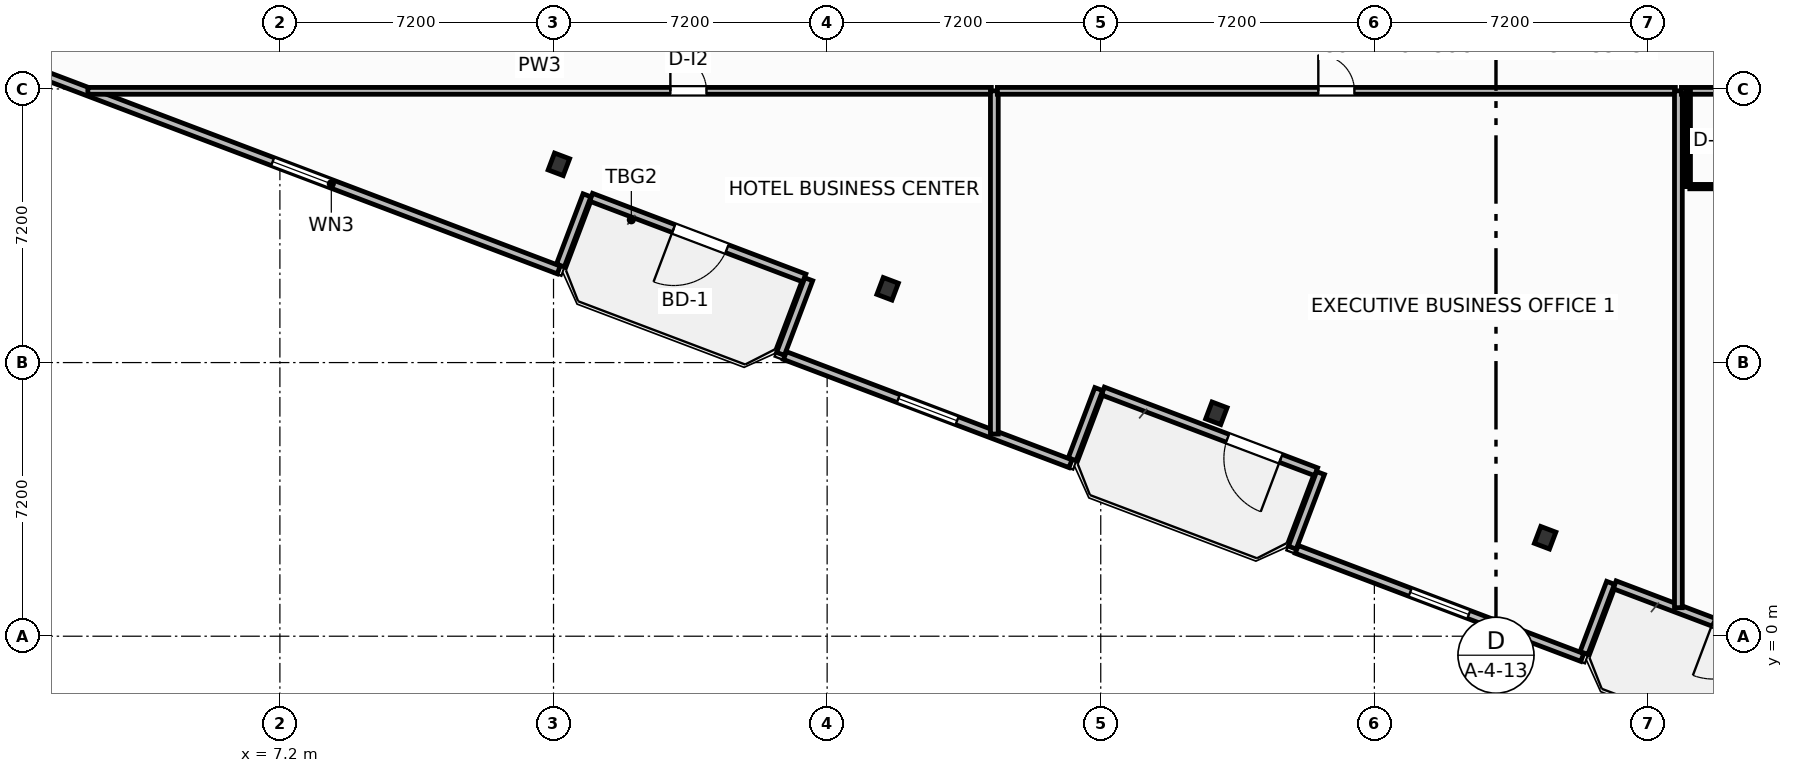
"""IFC4 building model, lengths in metres.
Left out: names, types, materials, properties, quantities, classifications, styles, units other than length and angle.
Written with IfcOpenShell. Run it as: python <this file> out.ifc"""

import sys

from ifc_helpers import new_model, si_unit, direction, frame, frame_2d, origin, origin_2d, place, context, subcontext, project, spatial, rectangle, i_section, extrude, element, fill, save


model = new_model("IFC4")
c1 = context("Model", 3, precision=1e-05, world=origin(), true_north=direction((0.0, 1.0)))
c2 = subcontext(c1, "Body", "Model", "MODEL_VIEW")
j1 = project(units=[si_unit("LENGTHUNIT", "METRE"), si_unit("PLANEANGLEUNIT", "RADIAN")], contexts=[c1])
p1 = place(None, origin())
s1 = spatial("IfcSite", under=j1, at=p1, CompositionType="ELEMENT")
p2 = place(p1, origin())
s2 = spatial("IfcBuilding", under=s1, at=p2, CompositionType="ELEMENT")
p3 = place(p2, frame((0.0, 0.0, 87.3)))
s3 = spatial("IfcBuildingStorey", under=s2, at=p3, CompositionType="ELEMENT", Elevation=87.3)
for number, where, z_axis, x_axis in (
    (1, (14.541, 12.416, 0.0), (0.0, 0.0, 1.0), (0.935, -0.354, 0.0)),
    (2, (23.192, 9.141, 0.0), (0.0, 0.0, 1.0), (0.935, -0.354, 0.0)),
    (3, (31.843, 5.866, 0.0), (0.0, 0.0, 1.0), (0.935, -0.354, 0.0)),
    (4, (40.493, 2.591, 0.0), (0.0, 0.0, 1.0), (0.935, -0.354, 0.0)),
):
    element("IfcColumn", number, at=place(p3, frame(where, z_axis=z_axis, x_axis=x_axis)), inside=s3, PredefinedType="COLUMN", context=c2, shape_type="SweptSolid", body=[
        extrude(i_section(OverallWidth=0.424, OverallDepth=0.474, WebThickness=0.048, FlangeThickness=0.077, FilletRadius=0.025, at=origin_2d()), origin(), (0.0, 0.0, 1.0), 3.7),
    ])
p4 = place(p3, frame((21.0, 9.425, 0.0), z_axis=(0.0, 0.0, 1.0), x_axis=(-0.93521416643, 0.354082565101, 0.0)))
e5 = element("IfcWall", 5, at=p4, inside=s3, PredefinedType="SOLIDWALL", context=c2, shape_type="SweptSolid", body=[
    extrude(rectangle(XDim=6.0, YDim=0.22, at=frame_2d((3.0, 0.0))), origin(), (0.0, 0.0, 1.0), 2.73),
])
p5 = place(p4, frame((2.176, 0.0, 0.0)))
e6 = element("IfcOpeningElement", 6, at=p5, cuts=e5, PredefinedType="OPENING", context=c2, shape_type="SweptSolid", body=[
    extrude(rectangle(XDim=1.5, YDim=2.25, at=frame_2d((0.75, 1.125))), frame((0.0, 0.12, 0.0), z_axis=(0.0, -1.0, 0.0), x_axis=(1.0, 0.0, 0.0)), (0.0, 0.0, 1.0), 0.24),
])
p6 = place(p3, frame((34.468, 4.327, 0.0), z_axis=(0.0, 0.0, 1.0), x_axis=(-0.9352192676, 0.354069091436, 0.0)))
e7 = element("IfcWall", 7, at=p6, inside=s3, PredefinedType="SOLIDWALL", context=c2, shape_type="SweptSolid", body=[
    extrude(rectangle(XDim=6.0, YDim=0.22, at=frame_2d((3.0, 0.0))), origin(), (0.0, 0.0, 1.0), 2.73),
])
p7 = place(p6, frame((0.992, 0.0, 0.0)))
e8 = element("IfcOpeningElement", 8, at=p7, cuts=e7, PredefinedType="OPENING", context=c2, shape_type="SweptSolid", body=[
    extrude(rectangle(XDim=1.5, YDim=2.25, at=frame_2d((0.75, 1.125))), frame((0.0, 0.12, 0.0), z_axis=(0.0, -1.0, 0.0), x_axis=(1.0, 0.0, 0.0)), (0.0, 0.0, 1.0), 0.24),
])
p8 = place(p3, frame((47.935, -0.771, 0.0), z_axis=(0.0, 0.0, 1.0), x_axis=(-0.935227640088, 0.354046976001, 0.0)))
e9 = element("IfcWall", 9, at=p8, inside=s3, PredefinedType="SOLIDWALL", context=c2, shape_type="SweptSolid", body=[
    extrude(rectangle(XDim=6.0, YDim=0.22, at=frame_2d((3.0, 0.0))), origin(), (0.0, 0.0, 1.0), 2.73),
])
p9 = place(p8, frame((1.732, 0.0, 0.0)))
e10 = element("IfcOpeningElement", 10, at=p9, cuts=e9, PredefinedType="OPENING", context=c2, shape_type="SweptSolid", body=[
    extrude(rectangle(XDim=1.5, YDim=2.25, at=frame_2d((0.75, 1.125))), frame((0.0, 0.12, 0.0), z_axis=(0.0, -1.0, 0.0), x_axis=(1.0, 0.0, 0.0)), (0.0, 0.0, 1.0), 0.24),
])
p10 = place(p3, frame((1.026, 14.753, 0.0), z_axis=(0.0, 0.0, 1.0), x_axis=(0.935222448475, -0.354060689526, 0.0)))
e11 = element("IfcWall", 11, at=p10, inside=s3, PredefinedType="SOLIDWALL", context=c2, shape_type="SweptSolid", body=[
    extrude(rectangle(XDim=14.447, YDim=0.22, at=frame_2d((7.224, 0.0))), origin(), (0.0, 0.0, 1.0), 2.73),
])
p11 = place(p10, frame((6.399, 0.0, 0.8)))
e12 = element("IfcOpeningElement", 12, at=p11, cuts=e11, PredefinedType="OPENING", context=c2, shape_type="SweptSolid", body=[
    extrude(rectangle(XDim=1.65, YDim=1.65, at=frame_2d((0.825, 0.825))), frame((0.0, 0.12, 0.0), z_axis=(0.0, -1.0, 0.0), x_axis=(1.0, 0.0, 0.0)), (0.0, 0.0, 1.0), 0.24),
])
p12 = place(p3, frame((14.581, 9.755, 0.0), z_axis=(0.0, 0.0, 1.0), x_axis=(0.354061611705, 0.935222099352, 0.0)))
e13 = element("IfcWall", 13, at=p12, inside=s3, PredefinedType="SOLIDWALL", context=c2, shape_type="SweptSolid", body=[
    extrude(rectangle(XDim=1.975, YDim=0.22, at=frame_2d((0.987, 0.0))), origin(), (0.0, 0.0, 1.0), 2.73),
])
p13 = place(p3, frame((21.116, 9.392, 0.0), z_axis=(0.0, 0.0, 1.0), x_axis=(-0.353988291547, -0.935249854022, 0.0)))
e14 = element("IfcWall", 14, at=p13, inside=s3, PredefinedType="SOLIDWALL", context=c2, shape_type="SweptSolid", body=[
    extrude(rectangle(XDim=2.1, YDim=0.22, at=frame_2d((1.05, 0.0))), origin(), (0.0, 0.0, 1.0), 2.73),
])
p14 = place(p3, frame((20.49, 7.384, 0.0), z_axis=(0.0, 0.0, 1.0), x_axis=(0.935230796934, -0.354038636968, 0.0)))
e15 = element("IfcWall", 15, at=p14, inside=s3, PredefinedType="SOLIDWALL", context=c2, shape_type="SweptSolid", body=[
    extrude(rectangle(XDim=8.035, YDim=0.22, at=frame_2d((4.018, 0.0))), origin(), (0.0, 0.0, 1.0), 2.73),
])
p15 = place(p14, frame((3.192, 0.0, 0.8)))
e16 = element("IfcOpeningElement", 16, at=p15, cuts=e15, PredefinedType="OPENING", context=c2, shape_type="SweptSolid", body=[
    extrude(rectangle(XDim=1.65, YDim=1.65, at=frame_2d((0.825, 0.825))), frame((0.0, 0.12, 0.0), z_axis=(0.0, -1.0, 0.0), x_axis=(1.0, 0.0, 0.0)), (0.0, 0.0, 1.0), 0.24),
])
p16 = place(p3, frame((28.048, 4.656, 0.0), z_axis=(0.0, 0.0, 1.0), x_axis=(0.354128791944, 0.935196663123, 0.0)))
e17 = element("IfcWall", 17, at=p16, inside=s3, PredefinedType="SOLIDWALL", context=c2, shape_type="SweptSolid", body=[
    extrude(rectangle(XDim=1.975, YDim=0.22, at=frame_2d((0.988, 0.0))), origin(), (0.0, 0.0, 1.0), 2.73),
])
p17 = place(p3, frame((34.583, 4.294, 0.0), z_axis=(0.0, 0.0, 1.0), x_axis=(-0.354128469405, -0.935196785258, 0.0)))
e18 = element("IfcWall", 18, at=p17, inside=s3, PredefinedType="SOLIDWALL", context=c2, shape_type="SweptSolid", body=[
    extrude(rectangle(XDim=2.1, YDim=0.22, at=frame_2d((1.05, 0.0))), origin(), (0.0, 0.0, 1.0), 2.73),
])
p18 = place(p3, frame((33.957, 2.286, 0.0), z_axis=(0.0, 0.0, 1.0), x_axis=(0.935220736163, -0.354065212427, 0.0)))
e19 = element("IfcWall", 19, at=p18, inside=s3, PredefinedType="SOLIDWALL", context=c2, shape_type="SweptSolid", body=[
    extrude(rectangle(XDim=8.035, YDim=0.22, at=frame_2d((4.018, 0.0))), origin(), (0.0, 0.0, 1.0), 2.73),
])
p19 = place(p18, frame((3.192, 0.0, 0.8)))
e20 = element("IfcOpeningElement", 20, at=p19, cuts=e19, PredefinedType="OPENING", context=c2, shape_type="SweptSolid", body=[
    extrude(rectangle(XDim=1.65, YDim=1.65, at=frame_2d((0.825, 0.825))), frame((0.0, 0.12, 0.0), z_axis=(0.0, -1.0, 0.0), x_axis=(1.0, 0.0, 0.0)), (0.0, 0.0, 1.0), 0.24),
])
p20 = place(p3, frame((41.516, -0.442, 0.0), z_axis=(0.0, 0.0, 1.0), x_axis=(0.354061611705, 0.935222099352, 0.0)))
e21 = element("IfcWall", 21, at=p20, inside=s3, PredefinedType="SOLIDWALL", context=c2, shape_type="SweptSolid", body=[
    extrude(rectangle(XDim=1.975, YDim=0.22, at=frame_2d((0.987, 0.0))), origin(), (0.0, 0.0, 1.0), 2.73),
])
p21 = place(p3, frame((2.146, 14.35, 0.0), z_axis=(0.0, 0.0, 1.0), x_axis=(1.0, 0.0, 0.0)))
e22 = element("IfcWall", 22, at=p21, inside=s3, PredefinedType="PARTITIONING", context=c2, shape_type="SweptSolid", body=[
    extrude(rectangle(XDim=23.774, YDim=0.18, at=frame_2d((11.887, 0.0))), origin(), (0.0, 0.0, 1.0), 3.45),
])
p22 = place(p21, frame((15.329, 0.0, 0.0)))
e23 = element("IfcOpeningElement", 23, at=p22, cuts=e22, PredefinedType="OPENING", context=c2, shape_type="SweptSolid", body=[
    extrude(rectangle(XDim=0.95, YDim=2.05, at=frame_2d((0.475, 1.025))), frame((0.0, 0.1, 0.0), z_axis=(0.0, -1.0, 0.0), x_axis=(1.0, 0.0, 0.0)), (0.0, 0.0, 1.0), 0.2),
])
p23 = place(p3, frame((26.0, 5.319, 0.0), z_axis=(0.0, 0.0, 1.0), x_axis=(0.0, 1.0, 0.0)))
e24 = element("IfcWall", 24, at=p23, inside=s3, PredefinedType="PARTITIONING", context=c2, shape_type="SweptSolid", body=[
    extrude(rectangle(XDim=9.031, YDim=0.205, at=frame_2d((4.515, 0.0))), origin(), (0.0, 0.0, 1.0), 3.45),
])
p24 = place(p3, frame((26.08, 14.35, 0.0), z_axis=(0.0, 0.0, 1.0), x_axis=(1.0, 0.0, 0.0)))
e25 = element("IfcWall", 25, at=p24, inside=s3, PredefinedType="PARTITIONING", context=c2, shape_type="SweptSolid", body=[
    extrude(rectangle(XDim=17.84, YDim=0.18, at=frame_2d((8.92, 0.0))), origin(), (0.0, 0.0, 1.0), 3.45),
])
p25 = place(p24, frame((8.445, 0.0, 0.0)))
e26 = element("IfcOpeningElement", 26, at=p25, cuts=e25, PredefinedType="OPENING", context=c2, shape_type="SweptSolid", body=[
    extrude(rectangle(XDim=0.95, YDim=2.05, at=frame_2d((0.475, 1.025))), frame((0.0, 0.1, 0.0), z_axis=(0.0, -1.0, 0.0), x_axis=(1.0, 0.0, 0.0)), (0.0, 0.0, 1.0), 0.2),
])
p26 = place(p3, frame((44.0, 0.75, 0.0), z_axis=(0.0, 0.0, 1.0), x_axis=(0.0, 1.0, 0.0)))
e27 = element("IfcWall", 27, at=p26, inside=s3, PredefinedType="PARTITIONING", context=c2, shape_type="SweptSolid", body=[
    extrude(rectangle(XDim=13.6, YDim=0.205, at=frame_2d((6.8, 0.0))), origin(), (0.0, 0.0, 1.0), 3.45),
])
p27 = place(p3, frame((44.08, 14.35, 0.0), z_axis=(0.0, 0.0, 1.0), x_axis=(1.0, 0.0, 0.0)))
e28 = element("IfcWall", 28, at=p27, inside=s3, PredefinedType="PARTITIONING", context=c2, shape_type="SweptSolid", body=[
    extrude(rectangle(XDim=14.84, YDim=0.18, at=frame_2d((7.42, 0.0))), origin(), (0.0, 0.0, 1.0), 3.45),
])
p28 = place(p27, frame((3.323, 0.0, 0.0)))
e29 = element("IfcOpeningElement", 29, at=p28, cuts=e28, PredefinedType="OPENING", context=c2, shape_type="SweptSolid", body=[
    extrude(rectangle(XDim=0.95, YDim=2.15, at=frame_2d((0.475, 1.075))), frame((0.0, 0.1, 0.0), z_axis=(0.0, -1.0, 0.0), x_axis=(1.0, 0.0, 0.0)), (0.0, 0.0, 1.0), 0.2),
])
p29 = place(p3, frame((44.3, 11.83, 0.0), z_axis=(0.0, 0.0, 1.0), x_axis=(1.0, 0.0, 0.0)))
e30 = element("IfcWall", 30, at=p29, inside=s3, PredefinedType="PARTITIONING", context=c2, shape_type="SweptSolid", body=[
    extrude(rectangle(XDim=2.15, YDim=0.115, at=frame_2d((1.075, 0.0))), origin(), (0.0, 0.0, 1.0), 3.45),
])
p30 = place(p3, frame((44.26, 11.83, 0.0), z_axis=(0.0, 0.0, 1.0), x_axis=(0.0, 1.0, 0.0)))
e31 = element("IfcWall", 31, at=p30, inside=s3, PredefinedType="PARTITIONING", context=c2, shape_type="SweptSolid", body=[
    extrude(rectangle(XDim=2.52, YDim=0.115, at=frame_2d((1.26, 0.0))), origin(), (0.0, 0.0, 1.0), 3.45),
])
p31 = place(p5, origin())
e32 = element("IfcDoor", 32, at=p31, inside=s3, OperationType="SINGLE_SWING_RIGHT", PredefinedType="DOOR", context=c2, shape_type="SweptSolid", body=[
    extrude(rectangle(XDim=1.5, YDim=2.25, at=frame_2d((0.75, 1.125))), frame((0.0, 0.025, 0.0), z_axis=(0.0, -1.0, 0.0), x_axis=(1.0, 0.0, 0.0)), (0.0, 0.0, 1.0), 0.05),
])
fill(e6, e32)
p32 = place(p7, origin())
e33 = element("IfcDoor", 33, at=p32, inside=s3, OperationType="SINGLE_SWING_LEFT", PredefinedType="DOOR", context=c2, shape_type="SweptSolid", body=[
    extrude(rectangle(XDim=1.5, YDim=2.25, at=frame_2d((0.75, 1.125))), frame((0.0, 0.025, 0.0), z_axis=(0.0, -1.0, 0.0), x_axis=(1.0, 0.0, 0.0)), (0.0, 0.0, 1.0), 0.05),
])
fill(e8, e33)
p33 = place(p9, origin())
e34 = element("IfcDoor", 34, at=p33, inside=s3, OperationType="SINGLE_SWING_RIGHT", PredefinedType="DOOR", context=c2, shape_type="SweptSolid", body=[
    extrude(rectangle(XDim=1.5, YDim=2.25, at=frame_2d((0.75, 1.125))), frame((0.0, 0.025, 0.0), z_axis=(0.0, -1.0, 0.0), x_axis=(1.0, 0.0, 0.0)), (0.0, 0.0, 1.0), 0.05),
])
fill(e10, e34)
p34 = place(p11, origin())
e35 = element("IfcWindow", 35, at=p34, inside=s3, PartitioningType="SINGLE_PANEL", PredefinedType="WINDOW", context=c2, shape_type="SweptSolid", body=[
    extrude(rectangle(XDim=1.65, YDim=1.65, at=frame_2d((0.825, 0.825))), frame((0.0, 0.03, 0.0), z_axis=(0.0, -1.0, 0.0), x_axis=(1.0, 0.0, 0.0)), (0.0, 0.0, 1.0), 0.06),
])
fill(e12, e35)
p35 = place(p15, origin())
e36 = element("IfcWindow", 36, at=p35, inside=s3, PartitioningType="SINGLE_PANEL", PredefinedType="WINDOW", context=c2, shape_type="SweptSolid", body=[
    extrude(rectangle(XDim=1.65, YDim=1.65, at=frame_2d((0.825, 0.825))), frame((0.0, 0.03, 0.0), z_axis=(0.0, -1.0, 0.0), x_axis=(1.0, 0.0, 0.0)), (0.0, 0.0, 1.0), 0.06),
])
fill(e16, e36)
p36 = place(p19, origin())
e37 = element("IfcWindow", 37, at=p36, inside=s3, PartitioningType="SINGLE_PANEL", PredefinedType="WINDOW", context=c2, shape_type="SweptSolid", body=[
    extrude(rectangle(XDim=1.65, YDim=1.65, at=frame_2d((0.825, 0.825))), frame((0.0, 0.03, 0.0), z_axis=(0.0, -1.0, 0.0), x_axis=(1.0, 0.0, 0.0)), (0.0, 0.0, 1.0), 0.06),
])
fill(e20, e37)
p37 = place(p22, origin())
e38 = element("IfcDoor", 38, at=p37, inside=s3, OperationType="SINGLE_SWING_LEFT", PredefinedType="DOOR", context=c2, shape_type="SweptSolid", body=[
    extrude(rectangle(XDim=0.95, YDim=2.05, at=frame_2d((0.475, 1.025))), frame((0.0, 0.025, 0.0), z_axis=(0.0, -1.0, 0.0), x_axis=(1.0, 0.0, 0.0)), (0.0, 0.0, 1.0), 0.05),
])
fill(e23, e38)
p38 = place(p25, origin())
e39 = element("IfcDoor", 39, at=p38, inside=s3, OperationType="SINGLE_SWING_LEFT", PredefinedType="DOOR", context=c2, shape_type="SweptSolid", body=[
    extrude(rectangle(XDim=0.95, YDim=2.05, at=frame_2d((0.475, 1.025))), frame((0.0, 0.025, 0.0), z_axis=(0.0, -1.0, 0.0), x_axis=(1.0, 0.0, 0.0)), (0.0, 0.0, 1.0), 0.05),
])
fill(e26, e39)
save(model, sys.argv[1])
